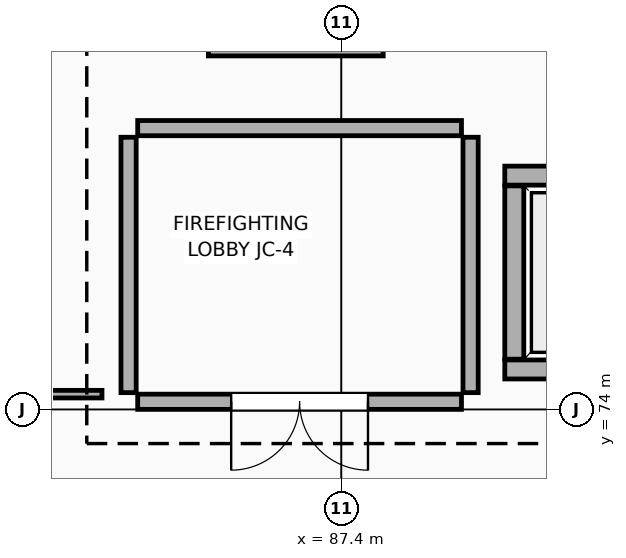
"""IFC4 building model, lengths in metres.
Left out: names, types, materials, properties, quantities, classifications, styles, units other than length and angle.
Written with IfcOpenShell. Run it as: python <this file> out.ifc"""

import sys

from ifc_helpers import new_model, si_unit, direction, frame, frame_2d, origin, place, context, subcontext, project, spatial, rectangle, extrude, element, fill, save


model = new_model("IFC4")
c1 = context("Model", 3, precision=1e-05, world=origin(), true_north=direction((0.0, 1.0)))
c2 = subcontext(c1, "Body", "Model", "MODEL_VIEW")
j1 = project(units=[si_unit("LENGTHUNIT", "METRE"), si_unit("PLANEANGLEUNIT", "RADIAN")], contexts=[c1])
p1 = place(None, origin())
s1 = spatial("IfcSite", under=j1, at=p1, CompositionType="ELEMENT")
p2 = place(p1, origin())
s2 = spatial("IfcBuilding", under=s1, at=p2, CompositionType="ELEMENT")
p3 = place(p2, frame((0.0, 0.0, 15.0)))
s3 = spatial("IfcBuildingStorey", under=s2, at=p3, CompositionType="ELEMENT", Elevation=15.0)
p4 = place(p3, frame((89.55, 74.525, 0.0), z_axis=(0.0, 0.0, 1.0), x_axis=(1.0, 0.0, 0.0)))
e1 = element("IfcWall", 1, at=p4, inside=s3, PredefinedType="STANDARD", context=c2, shape_type="SweptSolid", body=[
    extrude(rectangle(XDim=2.5, YDim=0.25, at=frame_2d((1.25, 0.0))), origin(), (0.0, 0.0, 1.0), 4.54),
])
p5 = place(p4, frame((0.65, 0.0, 0.0)))
e2 = element("IfcOpeningElement", 2, at=p5, cuts=e1, PredefinedType="OPENING", context=c2, shape_type="SweptSolid", body=[
    extrude(rectangle(XDim=1.2, YDim=2.05, at=frame_2d((0.6, 1.025))), frame((0.0, 0.135, 0.0), z_axis=(0.0, -1.0, 0.0), x_axis=(1.0, 0.0, 0.0)), (0.0, 0.0, 1.0), 0.27),
])
p6 = place(p3, frame((92.05, 77.075, 0.0), z_axis=(0.0, 0.0, 1.0), x_axis=(-1.0, 0.0, 0.0)))
e3 = element("IfcWall", 3, at=p6, inside=s3, PredefinedType="STANDARD", context=c2, shape_type="SweptSolid", body=[
    extrude(rectangle(XDim=2.5, YDim=0.25, at=frame_2d((1.25, 0.0))), origin(), (0.0, 0.0, 1.0), 4.54),
])
p7 = place(p3, frame((89.675, 76.94, 0.0), z_axis=(0.0, 0.0, 1.0), x_axis=(0.0, -1.0, 0.0)))
e4 = element("IfcWall", 4, at=p7, inside=s3, PredefinedType="STANDARD", context=c2, shape_type="SweptSolid", body=[
    extrude(rectangle(XDim=2.28, YDim=0.25, at=frame_2d((1.14, 0.0))), origin(), (0.0, 0.0, 1.0), 4.54),
])
p8 = place(p3, frame((85.65, 78.775, 0.0), z_axis=(0.0, 0.0, 1.0), x_axis=(1.0, 0.0, 0.0)))
e5 = element("IfcWall", 5, at=p8, inside=s3, PredefinedType="STANDARD", context=c2, shape_type="SweptSolid", body=[
    extrude(rectangle(XDim=2.3, YDim=0.25, at=frame_2d((1.15, 0.0))), origin(), (0.0, 0.0, 1.0), 4.54),
])
p9 = place(p3, frame((84.6, 74.22, 0.0), z_axis=(0.0, 0.0, 1.0), x_axis=(0.0, 1.0, 0.0)))
e6 = element("IfcWall", 6, at=p9, inside=s3, PredefinedType="PARTITIONING", context=c2, shape_type="SweptSolid", body=[
    extrude(rectangle(XDim=3.36, YDim=0.2, at=frame_2d((1.68, 0.0))), origin(), (0.0, 0.0, 1.0), 4.54),
])
p10 = place(p3, frame((84.72, 77.7, 0.0), z_axis=(0.0, 0.0, 1.0), x_axis=(1.0, 0.0, 0.0)))
e7 = element("IfcWall", 7, at=p10, inside=s3, PredefinedType="PARTITIONING", context=c2, shape_type="SweptSolid", body=[
    extrude(rectangle(XDim=4.26, YDim=0.2, at=frame_2d((2.13, 0.0))), origin(), (0.0, 0.0, 1.0), 4.54),
])
p11 = place(p3, frame((89.1, 77.58, 0.0), z_axis=(0.0, 0.0, 1.0), x_axis=(0.0, -1.0, 0.0)))
e8 = element("IfcWall", 8, at=p11, inside=s3, PredefinedType="PARTITIONING", context=c2, shape_type="SweptSolid", body=[
    extrude(rectangle(XDim=3.36, YDim=0.2, at=frame_2d((1.68, 0.0))), origin(), (0.0, 0.0, 1.0), 4.54),
])
p12 = place(p3, frame((88.98, 74.1, 0.0), z_axis=(0.0, 0.0, 1.0), x_axis=(-1.0, 0.0, 0.0)))
e9 = element("IfcWall", 9, at=p12, inside=s3, PredefinedType="PARTITIONING", context=c2, shape_type="SweptSolid", body=[
    extrude(rectangle(XDim=4.26, YDim=0.2, at=frame_2d((2.13, 0.0))), origin(), (0.0, 0.0, 1.0), 4.54),
])
p13 = place(p12, frame((1.23, 0.0, 0.0)))
e10 = element("IfcOpeningElement", 10, at=p13, cuts=e9, PredefinedType="OPENING", context=c2, shape_type="SweptSolid", body=[
    extrude(rectangle(XDim=1.8, YDim=2.15, at=frame_2d((0.9, 1.075))), frame((0.0, 0.11, 0.0), z_axis=(0.0, -1.0, 0.0), x_axis=(1.0, 0.0, 0.0)), (0.0, 0.0, 1.0), 0.22),
])
p14 = place(p3, frame((84.25, 74.2, 0.0), z_axis=(0.0, 0.0, 1.0), x_axis=(-1.0, 0.0, 0.0)))
e11 = element("IfcWall", 11, at=p14, inside=s3, PredefinedType="PARTITIONING", context=c2, shape_type="SweptSolid", body=[
    extrude(rectangle(XDim=4.51, YDim=0.1, at=frame_2d((2.255, 0.0))), origin(), (0.0, 0.0, 1.0), 4.54),
])
p15 = place(p13, origin())
e12 = element("IfcDoor", 12, at=p15, inside=s3, OperationType="DOUBLE_DOOR_SINGLE_SWING", PredefinedType="DOOR", context=c2, shape_type="SweptSolid", body=[
    extrude(rectangle(XDim=1.8, YDim=2.15, at=frame_2d((0.9, 1.075))), frame((0.0, 0.025, 0.0), z_axis=(0.0, -1.0, 0.0), x_axis=(1.0, 0.0, 0.0)), (0.0, 0.0, 1.0), 0.05),
])
fill(e10, e12)
save(model, sys.argv[1])
